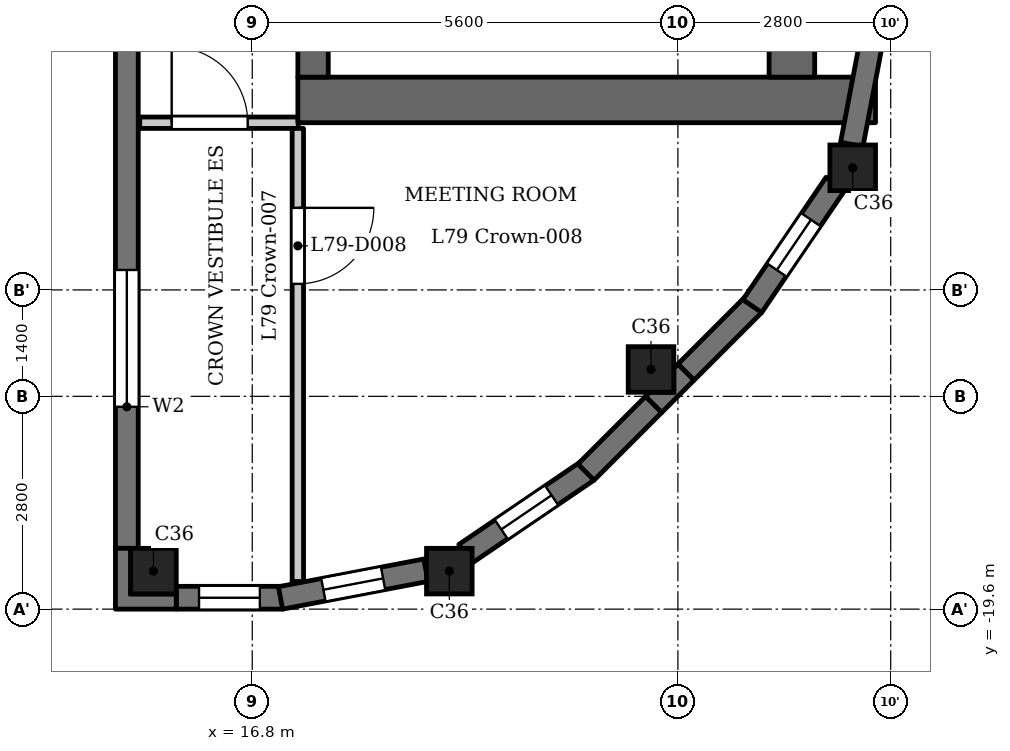
"""IFC4 building model, lengths in metres.
Left out: names, types, materials, properties, quantities, classifications, styles, units other than length and angle.
Written with IfcOpenShell. Run it as: python <this file> out.ifc"""

import sys

from ifc_helpers import new_model, si_unit, direction, frame, frame_2d, origin, origin_2d, place, context, subcontext, project, spatial, polyline, rectangle, outline, extrude, element, fill, save


model = new_model("IFC4")
c1 = context("Model", 3, precision=1e-05, world=origin(), true_north=direction((0.0, 1.0)))
c2 = subcontext(c1, "Body", "Model", "MODEL_VIEW")
j1 = project(units=[si_unit("LENGTHUNIT", "METRE"), si_unit("PLANEANGLEUNIT", "RADIAN")], contexts=[c1])
p1 = place(None, origin())
s1 = spatial("IfcSite", under=j1, at=p1, CompositionType="ELEMENT")
p2 = place(p1, origin())
s2 = spatial("IfcBuilding", under=s1, at=p2, CompositionType="ELEMENT")
p3 = place(p2, frame((0.0, 0.0, 306.9)))
s3 = spatial("IfcBuildingStorey", under=s2, at=p3, CompositionType="ELEMENT", Elevation=306.9)
for number, where, z_axis, x_axis in (
    (1, (15.5, -19.1, 0.0), (0.0, 0.0, 1.0), (1.0, 0.0, 0.0)),
    (2, (19.393, -19.1, 0.0), (0.0, 0.0, 1.0), (1.0, 0.0, 0.0)),
    (3, (22.046, -16.446, 0.0), (0.0, 0.0, 1.0), (1.0, 0.0, 0.0)),
    (4, (24.7, -13.793, 0.0), (0.0, 0.0, 1.0), (1.0, 0.0, 0.0)),
):
    element("IfcColumn", number, at=place(p3, frame(where, z_axis=z_axis, x_axis=x_axis)), inside=s3, PredefinedType="COLUMN", context=c2, shape_type="SweptSolid", body=[
        extrude(rectangle(XDim=0.6, YDim=0.6, at=origin_2d()), origin(), (0.0, 0.0, 1.0), 3.5),
    ])
p4 = place(p3, frame((15.15, -11.5, 0.0), z_axis=(0.0, 0.0, 1.0), x_axis=(0.0, -1.0, 0.0)))
e5 = element("IfcWall", 5, at=p4, inside=s3, PredefinedType="SOLIDWALL", context=c2, shape_type="SweptSolid", body=[
    extrude(rectangle(XDim=7.3, YDim=0.3, at=frame_2d((3.65, 0.0))), origin(), (0.0, 0.0, 1.0), 3.2),
])
p5 = place(p4, frame((3.637, 0.0, 0.9)))
e6 = element("IfcOpeningElement", 6, at=p5, cuts=e5, PredefinedType="OPENING", context=c2, shape_type="SweptSolid", body=[
    extrude(rectangle(XDim=1.8, YDim=1.25, at=frame_2d((0.9, 0.625))), frame((0.0, 0.16, 0.0), z_axis=(0.0, -1.0, 0.0), x_axis=(1.0, 0.0, 0.0)), (0.0, 0.0, 1.0), 0.32),
])
p6 = place(p3, frame((15.8, -19.45, 0.0), z_axis=(0.0, 0.0, 1.0), x_axis=(1.0, 0.0, 0.0)))
e7 = element("IfcWall", 7, at=p6, inside=s3, PredefinedType="SOLIDWALL", context=c2, shape_type="SweptSolid", body=[
    extrude(rectangle(XDim=1.4, YDim=0.3, at=frame_2d((0.7, 0.0))), origin(), (0.0, 0.0, 1.0), 3.2),
])
p7 = place(p6, frame((0.3, 0.0, 0.6)))
e8 = element("IfcOpeningElement", 8, at=p7, cuts=e7, PredefinedType="OPENING", context=c2, shape_type="SweptSolid", body=[
    extrude(rectangle(XDim=0.8, YDim=1.55, at=frame_2d((0.4, 0.775))), frame((0.0, 0.16, 0.0), z_axis=(0.0, -1.0, 0.0), x_axis=(1.0, 0.0, 0.0)), (0.0, 0.0, 1.0), 0.32),
])
p8 = place(p3, frame((17.172, -19.453, 0.0), z_axis=(0.0, 0.0, 1.0), x_axis=(0.982286967073, 0.187382801553, 0.0)))
e9 = element("IfcWall", 9, at=p8, inside=s3, PredefinedType="SOLIDWALL", context=c2, shape_type="SweptSolid", body=[
    extrude(rectangle(XDim=1.948, YDim=0.3, at=frame_2d((0.974, 0.0))), origin(), (0.0, 0.0, 1.0), 2.6),
])
p9 = place(p8, frame((0.574, 0.0, 0.6)))
e10 = element("IfcOpeningElement", 10, at=p9, cuts=e9, PredefinedType="OPENING", context=c2, shape_type="SweptSolid", body=[
    extrude(rectangle(XDim=0.8, YDim=1.55, at=frame_2d((0.4, 0.775))), frame((0.0, 0.16, 0.0), z_axis=(0.0, -1.0, 0.0), x_axis=(1.0, 0.0, 0.0)), (0.0, 0.0, 1.0), 0.32),
])
p10 = place(p3, frame((19.602, -18.874, 0.0), z_axis=(0.0, 0.0, 1.0), x_axis=(0.827022075481, 0.562169446579, 0.0)))
e11 = element("IfcWall", 11, at=p10, inside=s3, PredefinedType="SOLIDWALL", context=c2, shape_type="SweptSolid", body=[
    extrude(rectangle(XDim=1.948, YDim=0.3, at=frame_2d((0.974, 0.0))), origin(), (0.0, 0.0, 1.0), 2.6),
])
p11 = place(p10, frame((0.574, 0.0, 0.6)))
e12 = element("IfcOpeningElement", 12, at=p11, cuts=e11, PredefinedType="OPENING", context=c2, shape_type="SweptSolid", body=[
    extrude(rectangle(XDim=0.8, YDim=1.55, at=frame_2d((0.4, 0.775))), frame((0.0, 0.16, 0.0), z_axis=(0.0, -1.0, 0.0), x_axis=(1.0, 0.0, 0.0)), (0.0, 0.0, 1.0), 0.32),
])
for number, where, z_axis, x_axis in (
    (13, (21.191, -17.797, 0.0), (0.0, 0.0, 1.0), (0.707, 0.707, 0.0)),
    (14, (22.506, -16.482, 0.0), (0.0, 0.0, 1.0), (0.707, 0.707, 0.0)),
):
    element("IfcWall", number, at=place(p3, frame(where, z_axis=z_axis, x_axis=x_axis)), inside=s3, PredefinedType="SOLIDWALL", context=c2, shape_type="SweptSolid", body=[
        extrude(rectangle(XDim=1.26, YDim=0.3, at=frame_2d((0.63, 0.0))), origin(), (0.0, 0.0, 1.0), 3.2),
    ])
p12 = place(p3, frame((23.379, -15.613, 0.0), z_axis=(0.0, 0.0, 1.0), x_axis=(0.562025435703, 0.827119948752, 0.0)))
e15 = element("IfcWall", 15, at=p12, inside=s3, PredefinedType="SOLIDWALL", context=c2, shape_type="SweptSolid", body=[
    extrude(rectangle(XDim=1.948, YDim=0.3, at=frame_2d((0.974, 0.0))), origin(), (0.0, 0.0, 1.0), 2.6),
])
p13 = place(p12, frame((0.574, 0.0, 0.6)))
e16 = element("IfcOpeningElement", 16, at=p13, cuts=e15, PredefinedType="OPENING", context=c2, shape_type="SweptSolid", body=[
    extrude(rectangle(XDim=0.8, YDim=1.55, at=frame_2d((0.4, 0.775))), frame((0.0, 0.16, 0.0), z_axis=(0.0, -1.0, 0.0), x_axis=(1.0, 0.0, 0.0)), (0.0, 0.0, 1.0), 0.32),
])
p14 = place(p3, frame((24.688, -13.485, 0.0), z_axis=(0.0, 0.0, 1.0), x_axis=(0.187354129902, 0.982292436095, 0.0)))
e17 = element("IfcWall", 17, at=p14, inside=s3, PredefinedType="SOLIDWALL", context=c2, shape_type="SweptSolid", body=[
    extrude(rectangle(XDim=1.947, YDim=0.3, at=frame_2d((0.973, 0.0))), origin(), (0.0, 0.0, 1.0), 2.6),
])
p15 = place(p3, frame((17.4, -12.9, 0.0), z_axis=(0.0, 0.0, 1.0), x_axis=(1.0, 0.0, 0.0)))
e18 = element("IfcWall", 18, at=p15, inside=s3, PredefinedType="SHEAR", context=c2, shape_type="SweptSolid", body=[
    extrude(rectangle(XDim=7.6, YDim=0.6, at=frame_2d((3.8, 0.0))), origin(), (0.0, 0.0, 1.0), 3.2),
])
p16 = place(p3, frame((17.6, -12.6, 0.0), z_axis=(0.0, 0.0, 1.0), x_axis=(0.0, 1.0, 0.0)))
e19 = element("IfcWall", 19, at=p16, inside=s3, PredefinedType="SHEAR", context=c2, shape_type="SweptSolid", body=[
    extrude(rectangle(XDim=25.2, YDim=0.4, at=frame_2d((12.6, 0.0))), origin(), (0.0, 0.0, 1.0), 3.2),
])
p17 = place(p16, frame((8.8, 0.0, 0.0)))
e20 = element("IfcOpeningElement", 20, at=p17, cuts=e19, PredefinedType="OPENING", context=c2, shape_type="SweptSolid", body=[
    extrude(rectangle(XDim=0.9, YDim=2.1, at=frame_2d((0.45, 1.05))), frame((0.0, 0.21, 0.0), z_axis=(0.0, -1.0, 0.0), x_axis=(1.0, 0.0, 0.0)), (0.0, 0.0, 1.0), 0.42),
])
p18 = place(p16, frame((17.05, 0.0, 0.0)))
e21 = element("IfcOpeningElement", 21, at=p18, cuts=e19, PredefinedType="OPENING", context=c2, shape_type="SweptSolid", body=[
    extrude(rectangle(XDim=0.9, YDim=2.1, at=frame_2d((0.45, 1.05))), frame((0.0, 0.21, 0.0), z_axis=(0.0, -1.0, 0.0), x_axis=(1.0, 0.0, 0.0)), (0.0, 0.0, 1.0), 0.42),
])
p19 = place(p16, frame((23.25, 0.0, 0.0)))
e22 = element("IfcOpeningElement", 22, at=p19, cuts=e19, PredefinedType="OPENING", context=c2, shape_type="SweptSolid", body=[
    extrude(rectangle(XDim=1.1, YDim=2.1, at=frame_2d((0.55, 1.05))), frame((0.0, 0.21, 0.0), z_axis=(0.0, -1.0, 0.0), x_axis=(1.0, 0.0, 0.0)), (0.0, 0.0, 1.0), 0.42),
])
p20 = place(p16, frame((0.85, 0.0, 0.0)))
e23 = element("IfcOpeningElement", 23, at=p20, cuts=e19, PredefinedType="OPENING", context=c2, shape_type="SweptSolid", body=[
    extrude(rectangle(XDim=1.1, YDim=2.1, at=frame_2d((0.55, 1.05))), frame((0.0, 0.21, 0.0), z_axis=(0.0, -1.0, 0.0), x_axis=(1.0, 0.0, 0.0)), (0.0, 0.0, 1.0), 0.42),
])
p21 = place(p16, frame((13.075, 0.0, 0.0)))
e24 = element("IfcOpeningElement", 24, at=p21, cuts=e19, PredefinedType="OPENING", context=c2, shape_type="SweptSolid", body=[
    extrude(rectangle(XDim=1.8, YDim=2.1, at=frame_2d((0.9, 1.05))), frame((0.0, 0.21, 0.0), z_axis=(0.0, -1.0, 0.0), x_axis=(1.0, 0.0, 0.0)), (0.0, 0.0, 1.0), 0.42),
])
p22 = place(p3, frame((23.9, -12.6, 0.0), z_axis=(0.0, 0.0, 1.0), x_axis=(0.0, 1.0, 0.0)))
e25 = element("IfcWall", 25, at=p22, inside=s3, PredefinedType="SHEAR", context=c2, shape_type="SweptSolid", body=[
    extrude(rectangle(XDim=25.2, YDim=0.6, at=frame_2d((12.6, 0.0))), origin(), (0.0, 0.0, 1.0), 3.2),
])
p23 = place(p3, frame((15.32, -13.2, 0.0), z_axis=(0.0, 0.0, 1.0), x_axis=(1.0, 0.0, 0.0)))
e26 = element("IfcWall", 26, at=p23, inside=s3, PredefinedType="PARTITIONING", context=c2, shape_type="SweptSolid", body=[
    extrude(rectangle(XDim=2.085, YDim=0.15, at=frame_2d((1.042, 0.0))), origin(), (0.0, 0.0, 1.0), 3.2),
])
p24 = place(p23, frame((0.42, 0.0, 0.0)))
e27 = element("IfcOpeningElement", 27, at=p24, cuts=e26, PredefinedType="OPENING", context=c2, shape_type="SweptSolid", body=[
    extrude(rectangle(XDim=1.0, YDim=2.1, at=frame_2d((0.5, 1.05))), frame((0.0, 0.085, 0.0), z_axis=(0.0, -1.0, 0.0), x_axis=(1.0, 0.0, 0.0)), (0.0, 0.0, 1.0), 0.17),
])
p25 = place(p3, frame((17.4, -19.236, 0.0), z_axis=(0.0, 0.0, 1.0), x_axis=(0.0, 1.0, 0.0)))
e28 = element("IfcWall", 28, at=p25, inside=s3, PredefinedType="PARTITIONING", context=c2, shape_type="SweptSolid", body=[
    extrude(rectangle(XDim=5.961, YDim=0.15, at=frame_2d((2.981, 0.0))), origin(), (0.0, 0.0, 1.0), 3.2),
])
p26 = place(p25, frame((3.917, 0.0, 0.0)))
e29 = element("IfcOpeningElement", 29, at=p26, cuts=e28, PredefinedType="OPENING", context=c2, shape_type="SweptSolid", body=[
    extrude(rectangle(XDim=1.0, YDim=2.1, at=frame_2d((0.5, 1.05))), frame((0.0, 0.085, 0.0), z_axis=(0.0, -1.0, 0.0), x_axis=(1.0, 0.0, 0.0)), (0.0, 0.0, 1.0), 0.17),
])
p27 = place(p3, origin())
e30 = element("IfcWall", 30, at=p27, inside=s3, PredefinedType="SOLIDWALL", context=c2, shape_type="SweptSolid", body=[
    extrude(outline(polyline([(21.976, -16.8), (22.188, -17.012), (22.612, -16.588), (22.4, -16.376), (22.346, -16.429), (22.346, -16.746), (22.029, -16.746), (21.976, -16.8)])), origin(), (0.0, 0.0, 1.0), 3.2),
])
e31 = element("IfcWall", 31, at=p27, inside=s3, PredefinedType="SOLIDWALL", context=c2, shape_type="SweptSolid", body=[
    extrude(outline(polyline([(15.0, -18.8), (15.0, -19.6), (15.8, -19.6), (15.8, -19.4), (15.2, -19.4), (15.2, -18.8), (15.0, -18.8)])), origin(), (0.0, 0.0, 1.0), 3.2),
])
p28 = place(p24, origin())
e32 = element("IfcDoor", 32, at=p28, inside=s3, OperationType="SINGLE_SWING_RIGHT", PredefinedType="DOOR", context=c2, shape_type="SweptSolid", body=[
    extrude(rectangle(XDim=1.0, YDim=2.1, at=frame_2d((0.5, 1.05))), frame((0.0, 0.025, 0.0), z_axis=(0.0, -1.0, 0.0), x_axis=(1.0, 0.0, 0.0)), (0.0, 0.0, 1.0), 0.05),
])
fill(e27, e32)
p29 = place(p26, origin())
e33 = element("IfcDoor", 33, at=p29, inside=s3, OperationType="SINGLE_SWING_RIGHT", PredefinedType="DOOR", context=c2, shape_type="SweptSolid", body=[
    extrude(rectangle(XDim=1.0, YDim=2.1, at=frame_2d((0.5, 1.05))), frame((0.0, 0.025, 0.0), z_axis=(0.0, -1.0, 0.0), x_axis=(1.0, 0.0, 0.0)), (0.0, 0.0, 1.0), 0.05),
])
fill(e29, e33)
p30 = place(p5, origin())
e34 = element("IfcWindow", 34, at=p30, inside=s3, PartitioningType="SINGLE_PANEL", PredefinedType="WINDOW", context=c2, shape_type="SweptSolid", body=[
    extrude(rectangle(XDim=1.8, YDim=1.25, at=frame_2d((0.9, 0.625))), frame((0.0, 0.03, 0.0), z_axis=(0.0, -1.0, 0.0), x_axis=(1.0, 0.0, 0.0)), (0.0, 0.0, 1.0), 0.06),
])
fill(e6, e34)
p31 = place(p7, origin())
e35 = element("IfcWindow", 35, at=p31, inside=s3, PartitioningType="SINGLE_PANEL", PredefinedType="WINDOW", context=c2, shape_type="SweptSolid", body=[
    extrude(rectangle(XDim=0.8, YDim=1.55, at=frame_2d((0.4, 0.775))), frame((0.0, 0.03, 0.0), z_axis=(0.0, -1.0, 0.0), x_axis=(1.0, 0.0, 0.0)), (0.0, 0.0, 1.0), 0.06),
])
fill(e8, e35)
p32 = place(p9, origin())
e36 = element("IfcWindow", 36, at=p32, inside=s3, PartitioningType="SINGLE_PANEL", PredefinedType="WINDOW", context=c2, shape_type="SweptSolid", body=[
    extrude(rectangle(XDim=0.8, YDim=1.55, at=frame_2d((0.4, 0.775))), frame((0.0, 0.03, 0.0), z_axis=(0.0, -1.0, 0.0), x_axis=(1.0, 0.0, 0.0)), (0.0, 0.0, 1.0), 0.06),
])
fill(e10, e36)
p33 = place(p11, origin())
e37 = element("IfcWindow", 37, at=p33, inside=s3, PartitioningType="SINGLE_PANEL", PredefinedType="WINDOW", context=c2, shape_type="SweptSolid", body=[
    extrude(rectangle(XDim=0.8, YDim=1.55, at=frame_2d((0.4, 0.775))), frame((0.0, 0.03, 0.0), z_axis=(0.0, -1.0, 0.0), x_axis=(1.0, 0.0, 0.0)), (0.0, 0.0, 1.0), 0.06),
])
fill(e12, e37)
p34 = place(p13, origin())
e38 = element("IfcWindow", 38, at=p34, inside=s3, PartitioningType="SINGLE_PANEL", PredefinedType="WINDOW", context=c2, shape_type="SweptSolid", body=[
    extrude(rectangle(XDim=0.8, YDim=1.55, at=frame_2d((0.4, 0.775))), frame((0.0, 0.03, 0.0), z_axis=(0.0, -1.0, 0.0), x_axis=(1.0, 0.0, 0.0)), (0.0, 0.0, 1.0), 0.06),
])
fill(e16, e38)
save(model, sys.argv[1])
